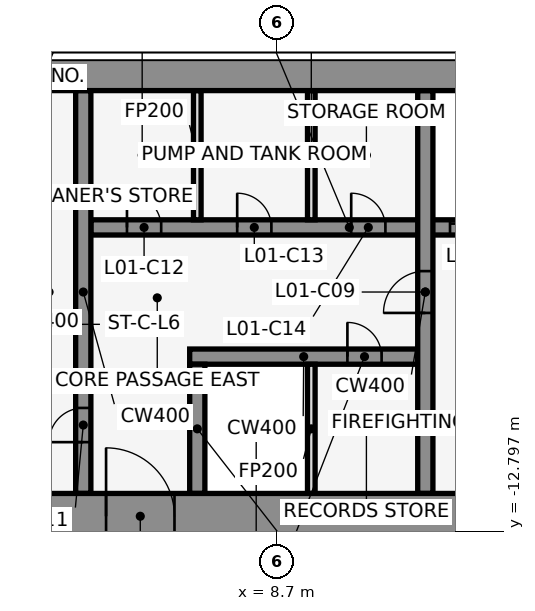
"""IFC4 building model, lengths in metres.
Left out: names, types, materials, properties, quantities, classifications, styles, units other than length and angle.
Written with IfcOpenShell. Run it as: python <this file> out.ifc"""

import sys

from ifc_helpers import new_model, si_unit, direction, frame, frame_2d, origin, place, context, subcontext, project, spatial, rectangle, extrude, element, fill, save


model = new_model("IFC4")
c1 = context("Model", 3, precision=1e-05, world=origin(), true_north=direction((0.0, 1.0)))
c2 = subcontext(c1, "Body", "Model", "MODEL_VIEW")
j1 = project(units=[si_unit("LENGTHUNIT", "METRE"), si_unit("PLANEANGLEUNIT", "RADIAN")], contexts=[c1])
p1 = place(None, origin())
s1 = spatial("IfcSite", under=j1, at=p1, CompositionType="ELEMENT")
p2 = place(p1, origin())
s2 = spatial("IfcBuilding", under=s1, at=p2, CompositionType="ELEMENT")
p3 = place(p2, frame((0.0, 0.0, 8.0)))
s3 = spatial("IfcBuildingStorey", under=s2, at=p3, CompositionType="ELEMENT", Elevation=8.0)
p4 = place(p3, frame((6.4, -8.2, 0.0), z_axis=(0.0, 0.0, 1.0), x_axis=(1.0, 0.0, 0.0)))
e1 = element("IfcWall", 1, at=p4, inside=s3, PredefinedType="SHEAR", context=c2, shape_type="SweptSolid", body=[
    extrude(rectangle(XDim=6.0, YDim=0.4, at=frame_2d((3.0, 0.0))), origin(), (0.0, 0.0, 1.0), 6.0),
])
p5 = place(p4, frame((4.15, 0.0, 0.0)))
e2 = element("IfcOpeningElement", 2, at=p5, cuts=e1, PredefinedType="OPENING", context=c2, shape_type="SweptSolid", body=[
    extrude(rectangle(XDim=0.9, YDim=2.1, at=frame_2d((0.45, 1.05))), frame((0.0, 0.212, 0.0), z_axis=(0.0, -1.0, 0.0), x_axis=(1.0, 0.0, 0.0)), (0.0, 0.0, 1.0), 0.424),
])
p6 = place(p3, frame((3.8, -4.8, 0.0), z_axis=(0.0, 0.0, 1.0), x_axis=(1.0, 0.0, 0.0)))
e3 = element("IfcWall", 3, at=p6, inside=s3, PredefinedType="SHEAR", context=c2, shape_type="SweptSolid", body=[
    extrude(rectangle(XDim=13.6, YDim=0.4, at=frame_2d((6.8, 0.0))), origin(), (0.0, 0.0, 1.0), 6.0),
])
p7 = place(p6, frame((9.45, 0.0, 0.0)))
e4 = element("IfcOpeningElement", 4, at=p7, cuts=e3, PredefinedType="OPENING", context=c2, shape_type="SweptSolid", body=[
    extrude(rectangle(XDim=1.1, YDim=2.1, at=frame_2d((0.55, 1.05))), frame((0.0, 0.212, 0.0), z_axis=(0.0, -1.0, 0.0), x_axis=(1.0, 0.0, 0.0)), (0.0, 0.0, 1.0), 0.424),
])
p8 = place(p6, frame((11.85, 0.0, 0.0)))
e5 = element("IfcOpeningElement", 5, at=p8, cuts=e3, PredefinedType="OPENING", context=c2, shape_type="SweptSolid", body=[
    extrude(rectangle(XDim=1.1, YDim=2.1, at=frame_2d((0.55, 1.05))), frame((0.0, 0.212, 0.0), z_axis=(0.0, -1.0, 0.0), x_axis=(1.0, 0.0, 0.0)), (0.0, 0.0, 1.0), 0.424),
])
p9 = place(p6, frame((0.95, 0.0, 0.0)))
e6 = element("IfcOpeningElement", 6, at=p9, cuts=e3, PredefinedType="OPENING", context=c2, shape_type="SweptSolid", body=[
    extrude(rectangle(XDim=0.9, YDim=2.1, at=frame_2d((0.45, 1.05))), frame((0.0, 0.212, 0.0), z_axis=(0.0, -1.0, 0.0), x_axis=(1.0, 0.0, 0.0)), (0.0, 0.0, 1.0), 0.424),
])
p10 = place(p6, frame((3.85, 0.0, 0.0)))
e7 = element("IfcOpeningElement", 7, at=p10, cuts=e3, PredefinedType="OPENING", context=c2, shape_type="SweptSolid", body=[
    extrude(rectangle(XDim=0.9, YDim=2.1, at=frame_2d((0.45, 1.05))), frame((0.0, 0.212, 0.0), z_axis=(0.0, -1.0, 0.0), x_axis=(1.0, 0.0, 0.0)), (0.0, 0.0, 1.0), 0.424),
])
p11 = place(p6, frame((6.85, 0.0, 0.0)))
e8 = element("IfcOpeningElement", 8, at=p11, cuts=e3, PredefinedType="OPENING", context=c2, shape_type="SweptSolid", body=[
    extrude(rectangle(XDim=0.9, YDim=2.1, at=frame_2d((0.45, 1.05))), frame((0.0, 0.212, 0.0), z_axis=(0.0, -1.0, 0.0), x_axis=(1.0, 0.0, 0.0)), (0.0, 0.0, 1.0), 0.424),
])
p12 = place(p3, frame((3.6, -11.8, 0.0), z_axis=(0.0, 0.0, 1.0), x_axis=(0.0, 1.0, 0.0)))
e9 = element("IfcWall", 9, at=p12, inside=s3, PredefinedType="SHEAR", context=c2, shape_type="SweptSolid", body=[
    extrude(rectangle(XDim=10.6, YDim=0.4, at=frame_2d((5.3, 0.0))), origin(), (0.0, 0.0, 1.0), 6.0),
])
p13 = place(p12, frame((1.35, 0.0, 0.0)))
e10 = element("IfcOpeningElement", 10, at=p13, cuts=e9, PredefinedType="OPENING", context=c2, shape_type="SweptSolid", body=[
    extrude(rectangle(XDim=0.9, YDim=2.1, at=frame_2d((0.45, 1.05))), frame((0.0, 0.212, 0.0), z_axis=(0.0, -1.0, 0.0), x_axis=(1.0, 0.0, 0.0)), (0.0, 0.0, 1.0), 0.424),
])
p14 = place(p3, frame((6.6, -11.8, 0.0), z_axis=(0.0, 0.0, 1.0), x_axis=(0.0, 1.0, 0.0)))
e11 = element("IfcWall", 11, at=p14, inside=s3, PredefinedType="SHEAR", context=c2, shape_type="SweptSolid", body=[
    extrude(rectangle(XDim=3.4, YDim=0.4, at=frame_2d((1.7, 0.0))), origin(), (0.0, 0.0, 1.0), 6.0),
])
for number, where, z_axis, x_axis in (
    (12, (6.6, -4.6, 0.0), (0.0, 0.0, 1.0), (0.0, 1.0, 0.0)),
    (13, (9.6, -11.8, 0.0), (0.0, 0.0, 1.0), (0.0, 1.0, 0.0)),
    (14, (9.6, -4.6, 0.0), (0.0, 0.0, 1.0), (0.0, 1.0, 0.0)),
):
    element("IfcWall", number, at=place(p3, frame(where, z_axis=z_axis, x_axis=x_axis)), inside=s3, PredefinedType="PARTITIONING", context=c2, shape_type="SweptSolid", body=[
        extrude(rectangle(XDim=3.4, YDim=0.2, at=frame_2d((1.7, 0.0))), origin(), (0.0, 0.0, 1.0), 5.7),
    ])
p15 = place(p3, frame((12.6, -11.8, 0.0), z_axis=(0.0, 0.0, 1.0), x_axis=(0.0, 1.0, 0.0)))
e15 = element("IfcWall", 15, at=p15, inside=s3, PredefinedType="SHEAR", context=c2, shape_type="SweptSolid", body=[
    extrude(rectangle(XDim=10.6, YDim=0.4, at=frame_2d((5.3, 0.0))), origin(), (0.0, 0.0, 1.0), 6.0),
])
p16 = place(p15, frame((4.75, 0.0, 0.0)))
e16 = element("IfcOpeningElement", 16, at=p16, cuts=e15, PredefinedType="OPENING", context=c2, shape_type="SweptSolid", body=[
    extrude(rectangle(XDim=1.1, YDim=2.1, at=frame_2d((0.55, 1.05))), frame((0.0, 0.212, 0.0), z_axis=(0.0, -1.0, 0.0), x_axis=(1.0, 0.0, 0.0)), (0.0, 0.0, 1.0), 0.424),
])
p17 = place(p3, frame((-22.0, -0.6, 0.0), z_axis=(0.0, 0.0, 1.0), x_axis=(1.0, 0.0, 0.0)))
e17 = element("IfcWall", 17, at=p17, inside=s3, PredefinedType="SHEAR", context=c2, shape_type="SweptSolid", body=[
    extrude(rectangle(XDim=44.0, YDim=1.2, at=frame_2d((22.0, 0.0))), origin(), (0.0, 0.0, 1.0), 6.0),
])
p18 = place(p3, frame((-22.0, -12.4, 0.0), z_axis=(0.0, 0.0, 1.0), x_axis=(1.0, 0.0, 0.0)))
e18 = element("IfcWall", 18, at=p18, inside=s3, PredefinedType="SHEAR", context=c2, shape_type="SweptSolid", body=[
    extrude(rectangle(XDim=44.0, YDim=1.2, at=frame_2d((22.0, 0.0))), origin(), (0.0, 0.0, 1.0), 6.0),
])
p19 = place(p18, frame((2.2, 0.0, 0.0)))
e19 = element("IfcOpeningElement", 19, at=p19, cuts=e18, PredefinedType="OPENING", context=c2, shape_type="SweptSolid", body=[
    extrude(rectangle(XDim=1.2, YDim=2.1, at=frame_2d((0.6, 1.05))), frame((0.0, 0.612, 0.0), z_axis=(0.0, -1.0, 0.0), x_axis=(1.0, 0.0, 0.0)), (0.0, 0.0, 1.0), 1.224),
])
p20 = place(p18, frame((21.4, 0.0, 0.0)))
e20 = element("IfcOpeningElement", 20, at=p20, cuts=e18, PredefinedType="OPENING", context=c2, shape_type="SweptSolid", body=[
    extrude(rectangle(XDim=1.2, YDim=2.1, at=frame_2d((0.6, 1.05))), frame((0.0, 0.612, 0.0), z_axis=(0.0, -1.0, 0.0), x_axis=(1.0, 0.0, 0.0)), (0.0, 0.0, 1.0), 1.224),
])
p21 = place(p18, frame((40.6, 0.0, 0.0)))
e21 = element("IfcOpeningElement", 21, at=p21, cuts=e18, PredefinedType="OPENING", context=c2, shape_type="SweptSolid", body=[
    extrude(rectangle(XDim=1.2, YDim=2.1, at=frame_2d((0.6, 1.05))), frame((0.0, 0.612, 0.0), z_axis=(0.0, -1.0, 0.0), x_axis=(1.0, 0.0, 0.0)), (0.0, 0.0, 1.0), 1.224),
])
p22 = place(p18, frame((16.0, 0.0, 0.0)))
e22 = element("IfcOpeningElement", 22, at=p22, cuts=e18, PredefinedType="OPENING", context=c2, shape_type="SweptSolid", body=[
    extrude(rectangle(XDim=1.8, YDim=2.1, at=frame_2d((0.9, 1.05))), frame((0.0, 0.612, 0.0), z_axis=(0.0, -1.0, 0.0), x_axis=(1.0, 0.0, 0.0)), (0.0, 0.0, 1.0), 1.224),
])
p23 = place(p18, frame((6.3, 0.0, 0.0)))
e23 = element("IfcOpeningElement", 23, at=p23, cuts=e18, PredefinedType="OPENING", context=c2, shape_type="SweptSolid", body=[
    extrude(rectangle(XDim=1.2, YDim=2.1, at=frame_2d((0.6, 1.05))), frame((0.0, 0.612, 0.0), z_axis=(0.0, -1.0, 0.0), x_axis=(1.0, 0.0, 0.0)), (0.0, 0.0, 1.0), 1.224),
])
p24 = place(p18, frame((26.2, 0.0, 0.0)))
e24 = element("IfcOpeningElement", 24, at=p24, cuts=e18, PredefinedType="OPENING", context=c2, shape_type="SweptSolid", body=[
    extrude(rectangle(XDim=1.8, YDim=2.1, at=frame_2d((0.9, 1.05))), frame((0.0, 0.612, 0.0), z_axis=(0.0, -1.0, 0.0), x_axis=(1.0, 0.0, 0.0)), (0.0, 0.0, 1.0), 1.224),
])
p25 = place(p18, frame((36.5, 0.0, 0.0)))
e25 = element("IfcOpeningElement", 25, at=p25, cuts=e18, PredefinedType="OPENING", context=c2, shape_type="SweptSolid", body=[
    extrude(rectangle(XDim=1.2, YDim=2.1, at=frame_2d((0.6, 1.05))), frame((0.0, 0.612, 0.0), z_axis=(0.0, -1.0, 0.0), x_axis=(1.0, 0.0, 0.0)), (0.0, 0.0, 1.0), 1.224),
])
p26 = place(p7, origin())
e26 = element("IfcDoor", 26, at=p26, inside=s3, OperationType="DOUBLE_DOOR_SLIDING", PredefinedType="DOOR", context=c2, shape_type="SweptSolid", body=[
    extrude(rectangle(XDim=1.1, YDim=2.1, at=frame_2d((0.55, 1.05))), frame((0.0, 0.025, 0.0), z_axis=(0.0, -1.0, 0.0), x_axis=(1.0, 0.0, 0.0)), (0.0, 0.0, 1.0), 0.05),
])
fill(e4, e26)
p27 = place(p16, frame((1.1, 0.0, 0.0), z_axis=(0.0, 0.0, 1.0), x_axis=(-1.0, 0.0, 0.0)))
e27 = element("IfcDoor", 27, at=p27, inside=s3, OperationType="SINGLE_SWING_RIGHT", PredefinedType="DOOR", context=c2, shape_type="SweptSolid", body=[
    extrude(rectangle(XDim=1.1, YDim=2.1, at=frame_2d((0.55, 1.05))), frame((0.0, 0.025, 0.0), z_axis=(0.0, -1.0, 0.0), x_axis=(1.0, 0.0, 0.0)), (0.0, 0.0, 1.0), 0.05),
])
fill(e16, e27)
p28 = place(p13, origin())
e28 = element("IfcDoor", 28, at=p28, inside=s3, OperationType="SINGLE_SWING_LEFT", PredefinedType="DOOR", context=c2, shape_type="SweptSolid", body=[
    extrude(rectangle(XDim=0.9, YDim=2.1, at=frame_2d((0.45, 1.05))), frame((0.0, 0.025, 0.0), z_axis=(0.0, -1.0, 0.0), x_axis=(1.0, 0.0, 0.0)), (0.0, 0.0, 1.0), 0.05),
])
fill(e10, e28)
p29 = place(p9, origin())
e29 = element("IfcDoor", 29, at=p29, inside=s3, OperationType="SINGLE_SWING_RIGHT", PredefinedType="DOOR", context=c2, shape_type="SweptSolid", body=[
    extrude(rectangle(XDim=0.9, YDim=2.1, at=frame_2d((0.45, 1.05))), frame((0.0, 0.025, 0.0), z_axis=(0.0, -1.0, 0.0), x_axis=(1.0, 0.0, 0.0)), (0.0, 0.0, 1.0), 0.05),
])
fill(e6, e29)
p30 = place(p10, origin())
e30 = element("IfcDoor", 30, at=p30, inside=s3, OperationType="SINGLE_SWING_LEFT", PredefinedType="DOOR", context=c2, shape_type="SweptSolid", body=[
    extrude(rectangle(XDim=0.9, YDim=2.1, at=frame_2d((0.45, 1.05))), frame((0.0, 0.025, 0.0), z_axis=(0.0, -1.0, 0.0), x_axis=(1.0, 0.0, 0.0)), (0.0, 0.0, 1.0), 0.05),
])
fill(e7, e30)
p31 = place(p11, origin())
e31 = element("IfcDoor", 31, at=p31, inside=s3, OperationType="SINGLE_SWING_RIGHT", PredefinedType="DOOR", context=c2, shape_type="SweptSolid", body=[
    extrude(rectangle(XDim=0.9, YDim=2.1, at=frame_2d((0.45, 1.05))), frame((0.0, 0.025, 0.0), z_axis=(0.0, -1.0, 0.0), x_axis=(1.0, 0.0, 0.0)), (0.0, 0.0, 1.0), 0.05),
])
fill(e8, e31)
p32 = place(p5, frame((0.9, 0.0, 0.0), z_axis=(0.0, 0.0, 1.0), x_axis=(-1.0, 0.0, 0.0)))
e32 = element("IfcDoor", 32, at=p32, inside=s3, OperationType="SINGLE_SWING_LEFT", PredefinedType="DOOR", context=c2, shape_type="SweptSolid", body=[
    extrude(rectangle(XDim=0.9, YDim=2.1, at=frame_2d((0.45, 1.05))), frame((0.0, 0.025, 0.0), z_axis=(0.0, -1.0, 0.0), x_axis=(1.0, 0.0, 0.0)), (0.0, 0.0, 1.0), 0.05),
])
fill(e2, e32)
p33 = place(p24, origin())
e33 = element("IfcDoor", 33, at=p33, inside=s3, OperationType="SINGLE_SWING_LEFT", PredefinedType="DOOR", context=c2, shape_type="SweptSolid", body=[
    extrude(rectangle(XDim=1.8, YDim=2.1, at=frame_2d((0.9, 1.05))), frame((0.0, 0.025, 0.0), z_axis=(0.0, -1.0, 0.0), x_axis=(1.0, 0.0, 0.0)), (0.0, 0.0, 1.0), 0.05),
])
fill(e24, e33)
save(model, sys.argv[1])
